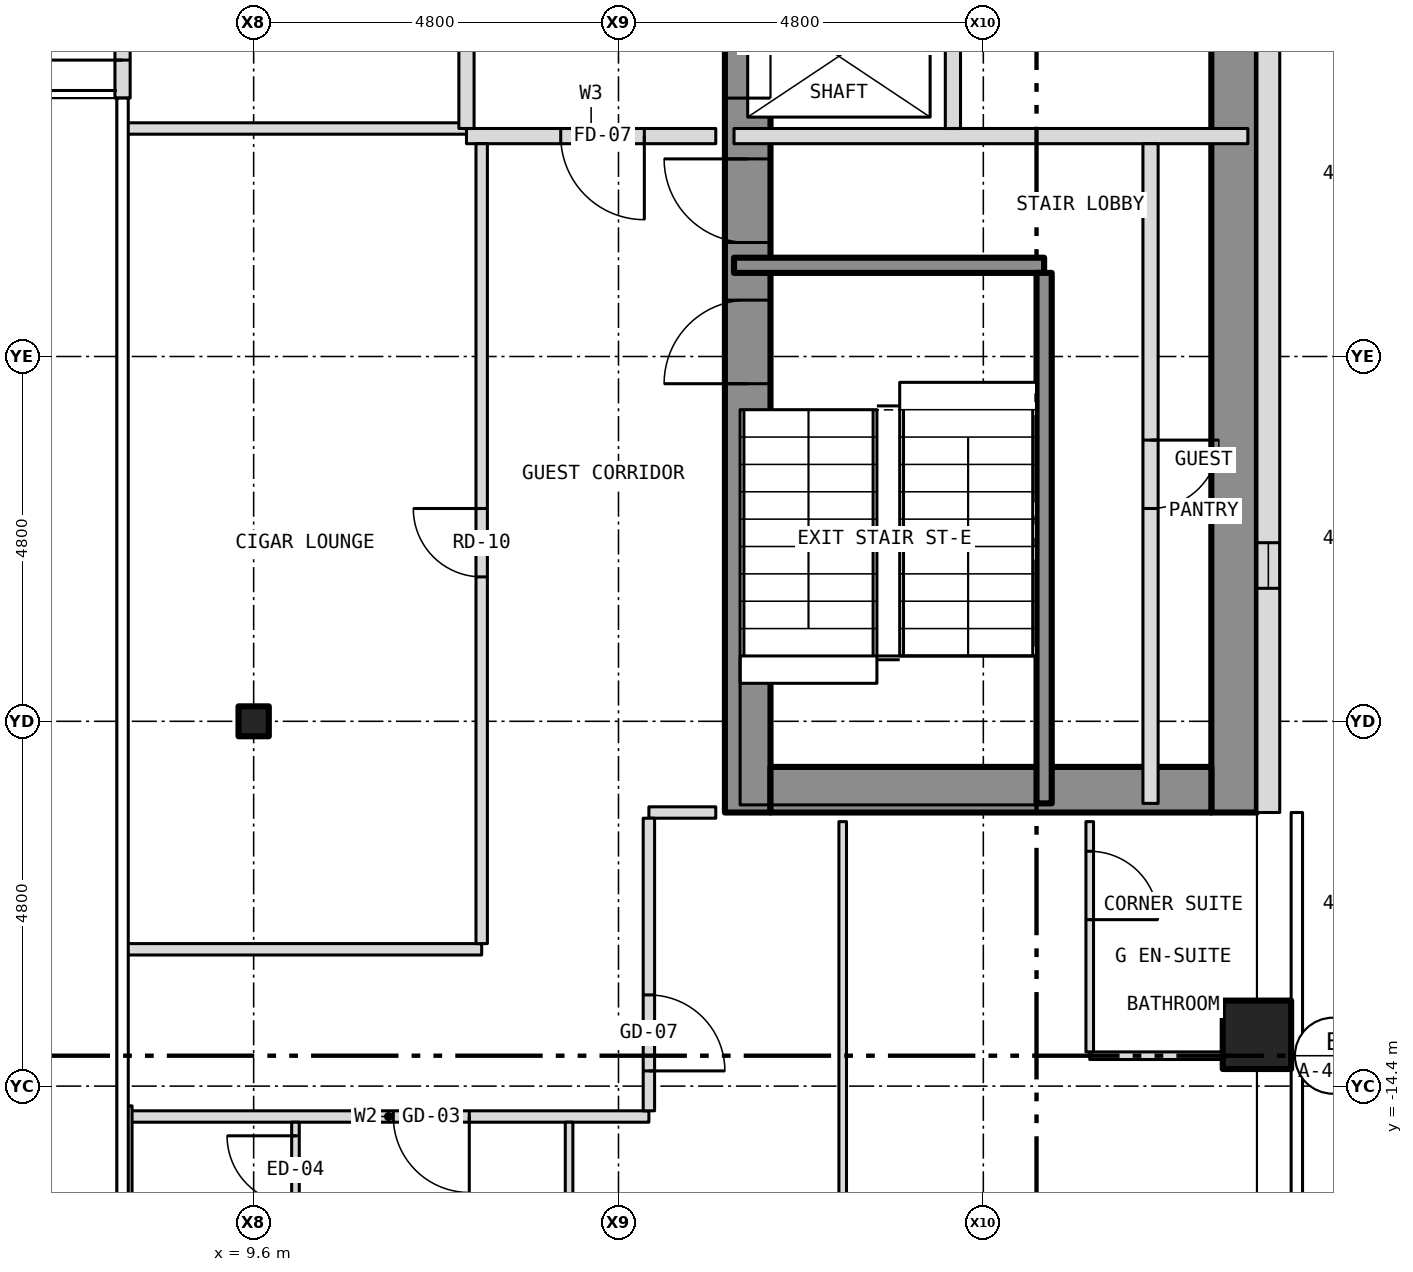
"""IFC4 building model, lengths in metres.
Left out: names, types, materials, properties, quantities, classifications, styles, units other than length and angle.
Written with IfcOpenShell. Run it as: python <this file> out.ifc"""

import sys

from ifc_helpers import new_model, si_unit, direction, frame, frame_2d, origin, origin_2d, place, context, subcontext, project, spatial, rectangle, hollow_rectangle, i_section, extrude, element, fill, save


model = new_model("IFC4")
c1 = context("Model", 3, precision=1e-05, world=origin(), true_north=direction((0.0, 1.0)))
c2 = subcontext(c1, "Body", "Model", "MODEL_VIEW")
j1 = project(units=[si_unit("LENGTHUNIT", "METRE"), si_unit("PLANEANGLEUNIT", "RADIAN")], contexts=[c1])
p1 = place(None, origin())
s1 = spatial("IfcSite", under=j1, at=p1, CompositionType="ELEMENT")
p2 = place(p1, origin())
s2 = spatial("IfcBuilding", under=s1, at=p2, CompositionType="ELEMENT")
p3 = place(p2, frame((0.0, 0.0, 120.5)))
s3 = spatial("IfcBuildingStorey", under=s2, at=p3, CompositionType="ELEMENT", Elevation=120.5)
p4 = place(p3, frame((22.8, -13.725, -0.15), z_axis=(0.0, 0.0, 1.0), x_axis=(1.0, 0.0, 0.0)))
e1 = element("IfcColumn", 1, at=p4, inside=s3, PredefinedType="COLUMN", context=c2, shape_type="SweptSolid", body=[
    extrude(hollow_rectangle(XDim=0.9, YDim=0.9, WallThickness=0.05, at=origin_2d()), origin(), (0.0, 0.0, 1.0), 3.5),
])
p5 = place(p3, frame((9.6, -9.6, -0.15), z_axis=(0.0, 0.0, 1.0), x_axis=(1.0, 0.0, 0.0)))
e2 = element("IfcColumn", 2, at=p5, inside=s3, PredefinedType="COLUMN", context=c2, shape_type="SweptSolid", body=[
    extrude(i_section(OverallWidth=0.399, OverallDepth=0.394, WebThickness=0.023, FlangeThickness=0.037, at=origin_2d()), origin(), (0.0, 0.0, 1.0), 3.5),
])
p6 = place(p3, frame((16.1, -10.8, 0.0), z_axis=(0.0, 0.0, 1.0), x_axis=(0.0, 1.0, 0.0)))
e3 = element("IfcWall", 3, at=p6, inside=s3, PredefinedType="SHEAR", context=c2, shape_type="SweptSolid", body=[
    extrude(rectangle(XDim=21.6, YDim=0.6, at=frame_2d((10.8, 0.0))), origin(), (0.0, 0.0, 1.0), 3.25),
])
p7 = place(p6, frame((9.4, 0.0, 0.0)))
e4 = element("IfcOpeningElement", 4, at=p7, cuts=e3, PredefinedType="OPENING", context=c2, shape_type="SweptSolid", body=[
    extrude(rectangle(XDim=1.1, YDim=2.1, at=frame_2d((0.55, 1.05))), frame((0.0, 0.312, 0.0), z_axis=(0.0, -1.0, 0.0), x_axis=(1.0, 0.0, 0.0)), (0.0, 0.0, 1.0), 0.624),
])
p8 = place(p6, frame((11.5, 0.0, 0.0)))
e5 = element("IfcOpeningElement", 5, at=p8, cuts=e3, PredefinedType="OPENING", context=c2, shape_type="SweptSolid", body=[
    extrude(rectangle(XDim=1.1, YDim=2.1, at=frame_2d((0.55, 1.05))), frame((0.0, 0.312, 0.0), z_axis=(0.0, -1.0, 0.0), x_axis=(1.0, 0.0, 0.0)), (0.0, 0.0, 1.0), 0.624),
])
p9 = place(p6, frame((13.6, 0.0, 0.0)))
e6 = element("IfcOpeningElement", 6, at=p9, cuts=e3, PredefinedType="OPENING", context=c2, shape_type="SweptSolid", body=[
    extrude(rectangle(XDim=1.1, YDim=2.1, at=frame_2d((0.55, 1.05))), frame((0.0, 0.312, 0.0), z_axis=(0.0, -1.0, 0.0), x_axis=(1.0, 0.0, 0.0)), (0.0, 0.0, 1.0), 0.624),
])
p10 = place(p6, frame((15.7, 0.0, 0.0)))
e7 = element("IfcOpeningElement", 7, at=p10, cuts=e3, PredefinedType="OPENING", context=c2, shape_type="SweptSolid", body=[
    extrude(rectangle(XDim=1.1, YDim=2.1, at=frame_2d((0.55, 1.05))), frame((0.0, 0.312, 0.0), z_axis=(0.0, -1.0, 0.0), x_axis=(1.0, 0.0, 0.0)), (0.0, 0.0, 1.0), 0.624),
])
p11 = place(p6, frame((17.8, 0.0, 0.0)))
e8 = element("IfcOpeningElement", 8, at=p11, cuts=e3, PredefinedType="OPENING", context=c2, shape_type="SweptSolid", body=[
    extrude(rectangle(XDim=1.1, YDim=2.1, at=frame_2d((0.55, 1.05))), frame((0.0, 0.312, 0.0), z_axis=(0.0, -1.0, 0.0), x_axis=(1.0, 0.0, 0.0)), (0.0, 0.0, 1.0), 0.624),
])
p12 = place(p6, frame((5.642, 0.0, 0.0)))
e9 = element("IfcOpeningElement", 9, at=p12, cuts=e3, PredefinedType="OPENING", context=c2, shape_type="SweptSolid", body=[
    extrude(rectangle(XDim=1.1, YDim=2.1, at=frame_2d((0.55, 1.05))), frame((0.0, 0.312, 0.0), z_axis=(0.0, -1.0, 0.0), x_axis=(1.0, 0.0, 0.0)), (0.0, 0.0, 1.0), 0.624),
])
p13 = place(p6, frame((7.5, 0.0, 0.0)))
e10 = element("IfcOpeningElement", 10, at=p13, cuts=e3, PredefinedType="OPENING", context=c2, shape_type="SweptSolid", body=[
    extrude(rectangle(XDim=1.1, YDim=2.1, at=frame_2d((0.55, 1.05))), frame((0.0, 0.312, 0.0), z_axis=(0.0, -1.0, 0.0), x_axis=(1.0, 0.0, 0.0)), (0.0, 0.0, 1.0), 0.624),
])
p14 = place(p3, frame((22.5, -10.8, 0.0), z_axis=(0.0, 0.0, 1.0), x_axis=(0.0, 1.0, 0.0)))
e11 = element("IfcWall", 11, at=p14, inside=s3, PredefinedType="SHEAR", context=c2, shape_type="SweptSolid", body=[
    extrude(rectangle(XDim=21.6, YDim=0.6, at=frame_2d((10.8, 0.0))), origin(), (0.0, 0.0, 1.0), 3.25),
])
p15 = place(p3, frame((16.4, -10.5, 0.0), z_axis=(0.0, 0.0, 1.0), x_axis=(1.0, 0.0, 0.0)))
e12 = element("IfcWall", 12, at=p15, inside=s3, PredefinedType="SHEAR", context=c2, shape_type="SweptSolid", body=[
    extrude(rectangle(XDim=5.8, YDim=0.6, at=frame_2d((2.9, 0.0))), origin(), (0.0, 0.0, 1.0), 3.25),
])
p16 = place(p3, frame((22.95, -10.8, 0.0), z_axis=(0.0, 0.0, 1.0), x_axis=(0.0, 1.0, 0.0)))
e13 = element("IfcWall", 13, at=p16, inside=s3, PredefinedType="SOLIDWALL", context=c2, shape_type="SweptSolid", body=[
    extrude(rectangle(XDim=21.6, YDim=0.3, at=frame_2d((10.8, 0.0))), origin(), (0.0, 0.0, 1.0), 3.5),
])
p17 = place(p16, frame((2.95, 0.0, 1.0)))
e14 = element("IfcOpeningElement", 14, at=p17, cuts=e13, PredefinedType="OPENING", context=c2, shape_type="SweptSolid", body=[
    extrude(rectangle(XDim=0.6, YDim=1.5, at=frame_2d((0.3, 0.75))), frame((0.0, 0.162, 0.0), z_axis=(0.0, -1.0, 0.0), x_axis=(1.0, 0.0, 0.0)), (0.0, 0.0, 1.0), 0.324),
])
p18 = place(p3, frame((7.875, -1.4, 0.0), z_axis=(0.0, 0.0, 1.0), x_axis=(0.0, 1.0, 0.0)))
e15 = element("IfcWall", 15, at=p18, inside=s3, PredefinedType="SOLIDWALL", context=c2, shape_type="SweptSolid", body=[
    extrude(rectangle(XDim=2.8, YDim=0.2, at=frame_2d((1.4, 0.0))), origin(), (0.0, 0.0, 1.0), 3.5),
])
p19 = place(p18, frame((0.5, 0.0, 0.0)))
e16 = element("IfcOpeningElement", 16, at=p19, cuts=e15, PredefinedType="OPENING", context=c2, shape_type="SweptSolid", body=[
    extrude(rectangle(XDim=1.8, YDim=2.1, at=frame_2d((0.9, 1.05))), frame((0.0, 0.112, 0.0), z_axis=(0.0, -1.0, 0.0), x_axis=(1.0, 0.0, 0.0)), (0.0, 0.0, 1.0), 0.224),
])
p20 = place(p3, frame((7.95, -14.8, 0.0), z_axis=(0.0, 0.0, 1.0), x_axis=(1.0, 0.0, 0.0)))
e17 = element("IfcWall", 17, at=p20, inside=s3, PredefinedType="PARTITIONING", context=c2, shape_type="SweptSolid", body=[
    extrude(rectangle(XDim=6.85, YDim=0.15, at=frame_2d((3.425, 0.0))), origin(), (0.0, 0.0, 1.0), 3.35),
])
p21 = place(p20, frame((3.487, 0.0, 0.0)))
e18 = element("IfcOpeningElement", 18, at=p21, cuts=e17, PredefinedType="OPENING", context=c2, shape_type="SweptSolid", body=[
    extrude(rectangle(XDim=1.0, YDim=2.1, at=frame_2d((0.5, 1.05))), frame((0.0, 0.087, 0.0), z_axis=(0.0, -1.0, 0.0), x_axis=(1.0, 0.0, 0.0)), (0.0, 0.0, 1.0), 0.174),
])
p22 = place(p3, frame((20.6, -14.0, 0.0), z_axis=(0.0, 0.0, 1.0), x_axis=(1.0, 0.0, 0.0)))
e19 = element("IfcWall", 19, at=p22, inside=s3, PredefinedType="PARTITIONING", context=c2, shape_type="SweptSolid", body=[
    extrude(rectangle(XDim=2.08, YDim=0.1, at=frame_2d((1.04, 0.0))), origin(), (0.0, 0.0, 1.0), 3.35),
])
p23 = place(p3, frame((7.92, -12.6, 0.0), z_axis=(0.0, 0.0, 1.0), x_axis=(1.0, 0.0, 0.0)))
e20 = element("IfcWall", 20, at=p23, inside=s3, PredefinedType="PARTITIONING", context=c2, shape_type="SweptSolid", body=[
    extrude(rectangle(XDim=4.68, YDim=0.15, at=frame_2d((2.34, 0.0))), origin(), (0.0, 0.0, 1.0), 3.35),
])
p24 = place(p3, frame((14.8, -10.8, 0.0), z_axis=(0.0, 0.0, 1.0), x_axis=(1.0, 0.0, 0.0)))
e21 = element("IfcWall", 21, at=p24, inside=s3, PredefinedType="PARTITIONING", context=c2, shape_type="SweptSolid", body=[
    extrude(rectangle(XDim=0.88, YDim=0.15, at=frame_2d((0.44, 0.0))), origin(), (0.0, 0.0, 1.0), 3.35),
])
p25 = place(p3, frame((15.92, -3.6, 0.0), z_axis=(0.0, 0.0, 1.0), x_axis=(1.0, 0.0, 0.0)))
e22 = element("IfcWall", 22, at=p25, inside=s3, PredefinedType="SHEAR", context=c2, shape_type="SweptSolid", body=[
    extrude(rectangle(XDim=4.08, YDim=0.2, at=frame_2d((2.04, 0.0))), origin(), (0.0, 0.0, 1.0), 3.25),
])
p26 = place(p3, frame((12.4, -1.9, 0.0), z_axis=(0.0, 0.0, 1.0), x_axis=(1.0, 0.0, 0.0)))
e23 = element("IfcWall", 23, at=p26, inside=s3, PredefinedType="PARTITIONING", context=c2, shape_type="SweptSolid", body=[
    extrude(rectangle(XDim=3.28, YDim=0.2, at=frame_2d((1.64, 0.0))), origin(), (0.0, 0.0, 1.0), 3.35),
])
p27 = place(p26, frame((1.24, 0.0, 0.0)))
e24 = element("IfcOpeningElement", 24, at=p27, cuts=e23, PredefinedType="OPENING", context=c2, shape_type="SweptSolid", body=[
    extrude(rectangle(XDim=1.1, YDim=2.1, at=frame_2d((0.55, 1.05))), frame((0.0, 0.112, 0.0), z_axis=(0.0, -1.0, 0.0), x_axis=(1.0, 0.0, 0.0)), (0.0, 0.0, 1.0), 0.224),
])
p28 = place(p3, frame((15.92, -1.9, 0.0), z_axis=(0.0, 0.0, 1.0), x_axis=(1.0, 0.0, 0.0)))
e25 = element("IfcWall", 25, at=p28, inside=s3, PredefinedType="PARTITIONING", context=c2, shape_type="SweptSolid", body=[
    extrude(rectangle(XDim=6.76, YDim=0.2, at=frame_2d((3.38, 0.0))), origin(), (0.0, 0.0, 1.0), 3.25),
])
p29 = place(p3, frame((7.92, -1.8, 0.0), z_axis=(0.0, 0.0, 1.0), x_axis=(1.0, 0.0, 0.0)))
e26 = element("IfcWall", 26, at=p29, inside=s3, PredefinedType="PARTITIONING", context=c2, shape_type="SweptSolid", body=[
    extrude(rectangle(XDim=4.48, YDim=0.15, at=frame_2d((2.24, 0.0))), origin(), (0.0, 0.0, 1.0), 3.35),
])
p30 = place(p3, frame((7.95, -18.14, 0.0), z_axis=(0.0, 0.0, 1.0), x_axis=(0.0, 1.0, 0.0)))
e27 = element("IfcWall", 27, at=p30, inside=s3, PredefinedType="PARTITIONING", context=c2, shape_type="SweptSolid", body=[
    extrude(rectangle(XDim=3.48, YDim=0.1, at=frame_2d((1.74, 0.0))), origin(), (0.0, 0.0, 1.0), 2.733),
])
p31 = place(p3, frame((10.15, -17.95, 0.0), z_axis=(0.0, 0.0, 1.0), x_axis=(0.0, 1.0, 0.0)))
e28 = element("IfcWall", 28, at=p31, inside=s3, PredefinedType="PARTITIONING", context=c2, shape_type="SweptSolid", body=[
    extrude(rectangle(XDim=3.075, YDim=0.1, at=frame_2d((1.538, 0.0))), origin(), (0.0, 0.0, 1.0), 3.35),
])
p32 = place(p31, frame((1.996, 0.0, 0.0)))
e29 = element("IfcOpeningElement", 29, at=p32, cuts=e28, PredefinedType="OPENING", context=c2, shape_type="SweptSolid", body=[
    extrude(rectangle(XDim=0.9, YDim=2.1, at=frame_2d((0.45, 1.05))), frame((0.0, 0.062, 0.0), z_axis=(0.0, -1.0, 0.0), x_axis=(1.0, 0.0, 0.0)), (0.0, 0.0, 1.0), 0.124),
])
p33 = place(p3, frame((12.4, -1.8, 0.0), z_axis=(0.0, 0.0, 1.0), x_axis=(0.0, 1.0, 0.0)))
e30 = element("IfcWall", 30, at=p33, inside=s3, PredefinedType="PARTITIONING", context=c2, shape_type="SweptSolid", body=[
    extrude(rectangle(XDim=4.0, YDim=0.2, at=frame_2d((2.0, 0.0))), origin(), (0.0, 0.0, 1.0), 3.35),
])
p34 = place(p33, frame((1.25, 0.0, 0.0)))
e31 = element("IfcOpeningElement", 31, at=p34, cuts=e30, PredefinedType="OPENING", context=c2, shape_type="SweptSolid", body=[
    extrude(rectangle(XDim=1.1, YDim=2.1, at=frame_2d((0.55, 1.05))), frame((0.0, 0.112, 0.0), z_axis=(0.0, -1.0, 0.0), x_axis=(1.0, 0.0, 0.0)), (0.0, 0.0, 1.0), 0.224),
])
p35 = place(p3, frame((12.6, -12.525, 0.0), z_axis=(0.0, 0.0, 1.0), x_axis=(0.0, 1.0, 0.0)))
e32 = element("IfcWall", 32, at=p35, inside=s3, PredefinedType="PARTITIONING", context=c2, shape_type="SweptSolid", body=[
    extrude(rectangle(XDim=10.525, YDim=0.15, at=frame_2d((5.262, 0.0))), origin(), (0.0, 0.0, 1.0), 3.35),
])
p36 = place(p35, frame((4.825, 0.0, 0.0)))
e33 = element("IfcOpeningElement", 33, at=p36, cuts=e32, PredefinedType="OPENING", context=c2, shape_type="SweptSolid", body=[
    extrude(rectangle(XDim=0.9, YDim=2.1, at=frame_2d((0.45, 1.05))), frame((0.0, 0.087, 0.0), z_axis=(0.0, -1.0, 0.0), x_axis=(1.0, 0.0, 0.0)), (0.0, 0.0, 1.0), 0.174),
])
p37 = place(p3, frame((13.75, -22.68, 0.0), z_axis=(0.0, 0.0, 1.0), x_axis=(0.0, 1.0, 0.0)))
e34 = element("IfcWall", 34, at=p37, inside=s3, PredefinedType="PARTITIONING", context=c2, shape_type="SweptSolid", body=[
    extrude(rectangle(XDim=7.805, YDim=0.1, at=frame_2d((3.902, 0.0))), origin(), (0.0, 0.0, 1.0), 3.35),
])
p38 = place(p3, frame((14.8, -14.725, 0.0), z_axis=(0.0, 0.0, 1.0), x_axis=(0.0, 1.0, 0.0)))
e35 = element("IfcWall", 35, at=p38, inside=s3, PredefinedType="PARTITIONING", context=c2, shape_type="SweptSolid", body=[
    extrude(rectangle(XDim=3.85, YDim=0.15, at=frame_2d((1.925, 0.0))), origin(), (0.0, 0.0, 1.0), 3.35),
])
p39 = place(p38, frame((0.525, 0.0, 0.0)))
e36 = element("IfcOpeningElement", 36, at=p39, cuts=e35, PredefinedType="OPENING", context=c2, shape_type="SweptSolid", body=[
    extrude(rectangle(XDim=1.0, YDim=2.1, at=frame_2d((0.5, 1.05))), frame((0.0, 0.087, 0.0), z_axis=(0.0, -1.0, 0.0), x_axis=(1.0, 0.0, 0.0)), (0.0, 0.0, 1.0), 0.174),
])
p40 = place(p3, frame((17.35, -23.28, 0.0), z_axis=(0.0, 0.0, 1.0), x_axis=(0.0, 1.0, 0.0)))
e37 = element("IfcWall", 37, at=p40, inside=s3, PredefinedType="PARTITIONING", context=c2, shape_type="SweptSolid", body=[
    extrude(rectangle(XDim=12.36, YDim=0.1, at=frame_2d((6.18, 0.0))), origin(), (0.0, 0.0, 1.0), 3.35),
])
p41 = place(p40, frame((6.03, 0.0, 0.0)))
e38 = element("IfcOpeningElement", 38, at=p41, cuts=e37, PredefinedType="OPENING", context=c2, shape_type="SweptSolid", body=[
    extrude(rectangle(XDim=0.9, YDim=2.1, at=frame_2d((0.45, 1.05))), frame((0.0, 0.062, 0.0), z_axis=(0.0, -1.0, 0.0), x_axis=(1.0, 0.0, 0.0)), (0.0, 0.0, 1.0), 0.124),
])
p42 = place(p3, frame((18.8, -1.8, 0.0), z_axis=(0.0, 0.0, 1.0), x_axis=(0.0, 1.0, 0.0)))
e39 = element("IfcWall", 39, at=p42, inside=s3, PredefinedType="PARTITIONING", context=c2, shape_type="SweptSolid", body=[
    extrude(rectangle(XDim=12.48, YDim=0.2, at=frame_2d((6.24, 0.0))), origin(), (0.0, 0.0, 1.0), 3.25),
])
p43 = place(p3, frame((20.0, -10.68, 0.0), z_axis=(0.0, 0.0, 1.0), x_axis=(0.0, 1.0, 0.0)))
e40 = element("IfcWall", 40, at=p43, inside=s3, PredefinedType="SHEAR", context=c2, shape_type="SweptSolid", body=[
    extrude(rectangle(XDim=6.98, YDim=0.2, at=frame_2d((3.49, 0.0))), origin(), (0.0, 0.0, 1.0), 3.25),
])
p44 = place(p3, frame((20.6, -13.95, 0.0), z_axis=(0.0, 0.0, 1.0), x_axis=(0.0, 1.0, 0.0)))
e41 = element("IfcWall", 41, at=p44, inside=s3, PredefinedType="PARTITIONING", context=c2, shape_type="SweptSolid", body=[
    extrude(rectangle(XDim=3.03, YDim=0.1, at=frame_2d((1.515, 0.0))), origin(), (0.0, 0.0, 1.0), 3.35),
])
p45 = place(p44, frame((1.74, 0.0, 0.0)))
e42 = element("IfcOpeningElement", 42, at=p45, cuts=e41, PredefinedType="OPENING", context=c2, shape_type="SweptSolid", body=[
    extrude(rectangle(XDim=0.9, YDim=2.1, at=frame_2d((0.45, 1.05))), frame((0.0, 0.062, 0.0), z_axis=(0.0, -1.0, 0.0), x_axis=(1.0, 0.0, 0.0)), (0.0, 0.0, 1.0), 0.124),
])
p46 = place(p3, frame((21.4, -10.68, 0.0), z_axis=(0.0, 0.0, 1.0), x_axis=(0.0, 1.0, 0.0)))
e43 = element("IfcWall", 43, at=p46, inside=s3, PredefinedType="PARTITIONING", context=c2, shape_type="SweptSolid", body=[
    extrude(rectangle(XDim=8.68, YDim=0.2, at=frame_2d((4.34, 0.0))), origin(), (0.0, 0.0, 1.0), 3.25),
])
p47 = place(p46, frame((3.88, 0.0, 0.0)))
e44 = element("IfcOpeningElement", 44, at=p47, cuts=e43, PredefinedType="OPENING", context=c2, shape_type="SweptSolid", body=[
    extrude(rectangle(XDim=0.9, YDim=2.1, at=frame_2d((0.45, 1.05))), frame((0.0, 0.112, 0.0), z_axis=(0.0, -1.0, 0.0), x_axis=(1.0, 0.0, 0.0)), (0.0, 0.0, 1.0), 0.224),
])
p48 = place(p17, origin())
e45 = element("IfcWindow", 45, at=p48, inside=s3, PartitioningType="SINGLE_PANEL", PredefinedType="WINDOW", context=c2, shape_type="SweptSolid", body=[
    extrude(rectangle(XDim=0.6, YDim=1.5, at=frame_2d((0.3, 0.75))), frame((0.0, -0.06, 0.0), z_axis=(0.0, -1.0, 0.0), x_axis=(1.0, 0.0, 0.0)), (0.0, 0.0, 1.0), 0.06),
])
fill(e14, e45)
p49 = place(p19, origin())
e46 = element("IfcDoor", 46, at=p49, inside=s3, OperationType="DOUBLE_DOOR_DOUBLE_SWING", PredefinedType="DOOR", context=c2, shape_type="SweptSolid", body=[
    extrude(rectangle(XDim=1.8, YDim=2.1, at=frame_2d((0.9, 1.05))), frame((0.0, 0.025, 0.0), z_axis=(0.0, -1.0, 0.0), x_axis=(1.0, 0.0, 0.0)), (0.0, 0.0, 1.0), 0.05),
])
fill(e16, e46)
p50 = place(p7, origin())
e47 = element("IfcDoor", 47, at=p50, inside=s3, OperationType="SLIDING_TO_LEFT", PredefinedType="DOOR", context=c2, shape_type="SweptSolid", body=[
    extrude(rectangle(XDim=1.1, YDim=2.1, at=frame_2d((0.55, 1.05))), frame((0.0, 0.025, 0.0), z_axis=(0.0, -1.0, 0.0), x_axis=(1.0, 0.0, 0.0)), (0.0, 0.0, 1.0), 0.05),
])
fill(e4, e47)
p51 = place(p12, origin())
e48 = element("IfcDoor", 48, at=p51, inside=s3, OperationType="SINGLE_SWING_LEFT", PredefinedType="DOOR", context=c2, shape_type="SweptSolid", body=[
    extrude(rectangle(XDim=1.1, YDim=2.1, at=frame_2d((0.55, 1.05))), frame((0.0, 0.025, 0.0), z_axis=(0.0, -1.0, 0.0), x_axis=(1.0, 0.0, 0.0)), (0.0, 0.0, 1.0), 0.05),
])
fill(e9, e48)
p52 = place(p13, origin())
e49 = element("IfcDoor", 49, at=p52, inside=s3, OperationType="SINGLE_SWING_RIGHT", PredefinedType="DOOR", context=c2, shape_type="SweptSolid", body=[
    extrude(rectangle(XDim=1.1, YDim=2.1, at=frame_2d((0.55, 1.05))), frame((0.0, 0.025, 0.0), z_axis=(0.0, -1.0, 0.0), x_axis=(1.0, 0.0, 0.0)), (0.0, 0.0, 1.0), 0.05),
])
fill(e10, e49)
p53 = place(p47, origin())
e50 = element("IfcDoor", 50, at=p53, inside=s3, OperationType="SINGLE_SWING_RIGHT", PredefinedType="DOOR", context=c2, shape_type="SweptSolid", body=[
    extrude(rectangle(XDim=0.9, YDim=2.1, at=frame_2d((0.45, 1.05))), frame((0.0, 0.025, 0.0), z_axis=(0.0, -1.0, 0.0), x_axis=(1.0, 0.0, 0.0)), (0.0, 0.0, 1.0), 0.05),
])
fill(e44, e50)
p54 = place(p27, origin())
e51 = element("IfcDoor", 51, at=p54, inside=s3, OperationType="SINGLE_SWING_RIGHT", PredefinedType="DOOR", context=c2, shape_type="SweptSolid", body=[
    extrude(rectangle(XDim=1.1, YDim=2.1, at=frame_2d((0.55, 1.05))), frame((0.0, 0.025, 0.0), z_axis=(0.0, -1.0, 0.0), x_axis=(1.0, 0.0, 0.0)), (0.0, 0.0, 1.0), 0.05),
])
fill(e24, e51)
p55 = place(p21, origin())
e52 = element("IfcDoor", 52, at=p55, inside=s3, OperationType="SINGLE_SWING_RIGHT", PredefinedType="DOOR", context=c2, shape_type="SweptSolid", body=[
    extrude(rectangle(XDim=1.0, YDim=2.1, at=frame_2d((0.5, 1.05))), frame((0.0, 0.025, 0.0), z_axis=(0.0, -1.0, 0.0), x_axis=(1.0, 0.0, 0.0)), (0.0, 0.0, 1.0), 0.05),
])
fill(e18, e52)
p56 = place(p32, origin())
e53 = element("IfcDoor", 53, at=p56, inside=s3, OperationType="SINGLE_SWING_RIGHT", PredefinedType="DOOR", context=c2, shape_type="SweptSolid", body=[
    extrude(rectangle(XDim=0.9, YDim=2.1, at=frame_2d((0.45, 1.05))), frame((0.0, 0.025, 0.0), z_axis=(0.0, -1.0, 0.0), x_axis=(1.0, 0.0, 0.0)), (0.0, 0.0, 1.0), 0.05),
])
fill(e29, e53)
p57 = place(p39, origin())
e54 = element("IfcDoor", 54, at=p57, inside=s3, OperationType="SINGLE_SWING_LEFT", PredefinedType="DOOR", context=c2, shape_type="SweptSolid", body=[
    extrude(rectangle(XDim=1.0, YDim=2.1, at=frame_2d((0.5, 1.05))), frame((0.0, 0.025, 0.0), z_axis=(0.0, -1.0, 0.0), x_axis=(1.0, 0.0, 0.0)), (0.0, 0.0, 1.0), 0.05),
])
fill(e36, e54)
p58 = place(p45, origin())
e55 = element("IfcDoor", 55, at=p58, inside=s3, OperationType="SINGLE_SWING_LEFT", PredefinedType="DOOR", context=c2, shape_type="SweptSolid", body=[
    extrude(rectangle(XDim=0.9, YDim=2.1, at=frame_2d((0.45, 1.05))), frame((0.0, 0.025, 0.0), z_axis=(0.0, -1.0, 0.0), x_axis=(1.0, 0.0, 0.0)), (0.0, 0.0, 1.0), 0.05),
])
fill(e42, e55)
p59 = place(p36, origin())
e56 = element("IfcDoor", 56, at=p59, inside=s3, OperationType="SINGLE_SWING_RIGHT", PredefinedType="DOOR", context=c2, shape_type="SweptSolid", body=[
    extrude(rectangle(XDim=0.9, YDim=2.1, at=frame_2d((0.45, 1.05))), frame((0.0, 0.025, 0.0), z_axis=(0.0, -1.0, 0.0), x_axis=(1.0, 0.0, 0.0)), (0.0, 0.0, 1.0), 0.05),
])
fill(e33, e56)
save(model, sys.argv[1])
